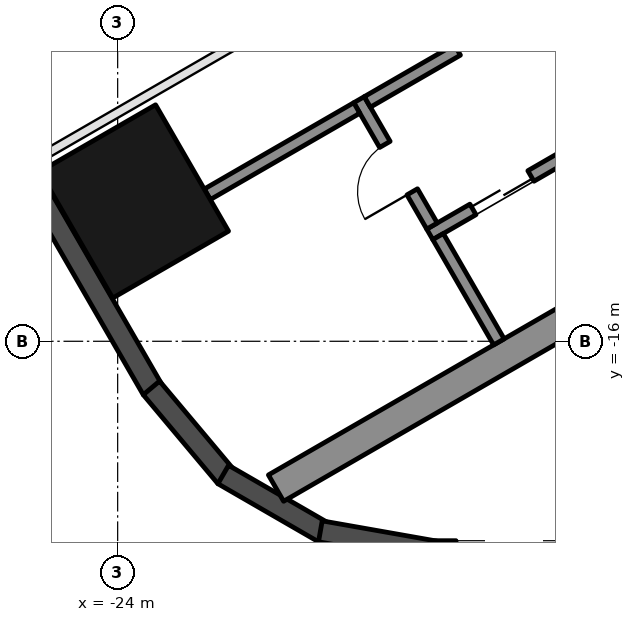
"""IFC4 building model, lengths in metres.
Left out: names, types, materials, properties, quantities, classifications, styles, units other than length and angle.
Written with IfcOpenShell. Run it as: python <this file> out.ifc"""

import sys

from ifc_helpers import new_model, si_unit, direction, frame, frame_2d, origin, origin_2d, place, context, subcontext, project, spatial, rectangle, hollow_rectangle, extrude, element, fill, save


model = new_model("IFC4")
c1 = context("Model", 3, precision=1e-05, world=origin(), true_north=direction((0.0, 1.0)))
c2 = subcontext(c1, "Body", "Model", "MODEL_VIEW")
j1 = project(units=[si_unit("LENGTHUNIT", "METRE"), si_unit("PLANEANGLEUNIT", "RADIAN")], contexts=[c1])
p1 = place(None, origin())
s1 = spatial("IfcSite", under=j1, at=p1, CompositionType="ELEMENT")
p2 = place(p1, origin())
s2 = spatial("IfcBuilding", under=s1, at=p2, CompositionType="ELEMENT")
p3 = place(p2, frame((0.0, 0.0, 216.9)))
s3 = spatial("IfcBuildingStorey", under=s2, at=p3, CompositionType="ELEMENT", Elevation=216.9)
p4 = place(p3, frame((-23.729, -13.7, 0.0), z_axis=(0.0, 0.0, 1.0), x_axis=(-0.5, 0.866025403784, 0.0)))
e1 = element("IfcColumn", 1, at=p4, inside=s3, PredefinedType="COLUMN", context=c2, shape_type="SweptSolid", body=[
    extrude(hollow_rectangle(XDim=2.4, YDim=2.2, WallThickness=0.06, at=origin_2d()), origin(), (0.0, 0.0, 1.0), 3.7),
])
p5 = place(p3, frame((-26.257, -11.893, 0.0), z_axis=(0.0, 0.0, 1.0), x_axis=(0.500018773155, -0.866014564827, 0.0)))
e2 = element("IfcWall", 2, at=p5, inside=s3, PredefinedType="SOLIDWALL", context=c2, shape_type="SweptSolid", body=[
    extrude(rectangle(XDim=5.658, YDim=0.35, at=frame_2d((2.829, 0.0))), origin(), (0.0, 0.0, 1.0), 3.55),
])
for number, where, z_axis, x_axis in (
    (3, (-23.445, -16.768, 0.0), (0.0, 0.0, 1.0), (0.643, -0.766, 0.0)),
    (4, (-22.264, -18.192, 0.0), (0.0, 0.0, 1.0), (0.866, -0.5, 0.0)),
):
    element("IfcWall", number, at=place(p3, frame(where, z_axis=z_axis, x_axis=x_axis)), inside=s3, PredefinedType="SOLIDWALL", context=c2, shape_type="SweptSolid", body=[
        extrude(rectangle(XDim=1.91, YDim=0.35, at=frame_2d((0.955, 0.0))), origin(), (0.0, 0.0, 1.0), 3.55),
    ])
p6 = place(p3, frame((-20.667, -19.126, 0.0), z_axis=(0.0, 0.0, 1.0), x_axis=(0.984798995425, -0.173697837091, 0.0)))
e5 = element("IfcWall", 5, at=p6, inside=s3, PredefinedType="SOLIDWALL", context=c2, shape_type="SweptSolid", body=[
    extrude(rectangle(XDim=1.91, YDim=0.35, at=frame_2d((0.955, 0.0))), origin(), (0.0, 0.0, 1.0), 3.55),
])
p7 = place(p3, frame((-18.816, -19.455, 0.0), z_axis=(0.0, 0.0, 1.0), x_axis=(1.0, 0.0, 0.0)))
e6 = element("IfcWall", 6, at=p7, inside=s3, PredefinedType="SOLIDWALL", context=c2, shape_type="SweptSolid", body=[
    extrude(rectangle(XDim=11.816, YDim=0.35, at=frame_2d((5.908, 0.0))), origin(), (0.0, 0.0, 1.0), 3.55),
])
p8 = place(p7, frame((0.381, 0.0, 0.3)))
e7 = element("IfcOpeningElement", 7, at=p8, cuts=e6, PredefinedType="OPENING", context=c2, shape_type="SweptSolid", body=[
    extrude(rectangle(XDim=1.9, YDim=2.65, at=frame_2d((0.95, 1.325))), frame((0.0, 0.185, 0.0), z_axis=(0.0, -1.0, 0.0), x_axis=(1.0, 0.0, 0.0)), (0.0, 0.0, 1.0), 0.37),
])
p9 = place(p7, frame((7.79, 0.0, 0.0)))
e8 = element("IfcOpeningElement", 8, at=p9, cuts=e6, PredefinedType="OPENING", context=c2, shape_type="SweptSolid", body=[
    extrude(rectangle(XDim=2.4, YDim=2.4, at=frame_2d((1.2, 1.2))), frame((0.0, 0.185, 0.0), z_axis=(0.0, -1.0, 0.0), x_axis=(1.0, 0.0, 0.0)), (0.0, 0.0, 1.0), 0.37),
])
p10 = place(p7, frame((3.741, 0.0, 0.3)))
e9 = element("IfcOpeningElement", 9, at=p10, cuts=e6, PredefinedType="OPENING", context=c2, shape_type="SweptSolid", body=[
    extrude(rectangle(XDim=1.7, YDim=2.65, at=frame_2d((0.85, 1.325))), frame((0.0, 0.185, 0.0), z_axis=(0.0, -1.0, 0.0), x_axis=(1.0, 0.0, 0.0)), (0.0, 0.0, 1.0), 0.37),
])
p11 = place(p7, frame((5.741, 0.0, 0.3)))
e10 = element("IfcOpeningElement", 10, at=p11, cuts=e6, PredefinedType="OPENING", context=c2, shape_type="SweptSolid", body=[
    extrude(rectangle(XDim=1.7, YDim=2.65, at=frame_2d((0.85, 1.325))), frame((0.0, 0.185, 0.0), z_axis=(0.0, -1.0, 0.0), x_axis=(1.0, 0.0, 0.0)), (0.0, 0.0, 1.0), 0.37),
])
p12 = place(p3, frame((-8.547, -10.997, 0.0), z_axis=(0.0, 0.0, 1.0), x_axis=(-0.866025009528, -0.500000682871, 0.0)))
e11 = element("IfcWall", 11, at=p12, inside=s3, PredefinedType="SHEAR", context=c2, shape_type="SweptSolid", body=[
    extrude(rectangle(XDim=14.837, YDim=0.5, at=frame_2d((7.418, 0.0))), origin(), (0.0, 0.0, 1.0), 3.5),
])
p13 = place(p3, frame((-10.068, -9.162, 0.0), z_axis=(0.0, 0.0, 1.0), x_axis=(-0.866032725843, -0.499987317609, 0.0)))
e12 = element("IfcWall", 12, at=p13, inside=s3, PredefinedType="SHEAR", context=c2, shape_type="SweptSolid", body=[
    extrude(rectangle(XDim=10.16, YDim=0.2, at=frame_2d((5.08, 0.0))), origin(), (0.0, 0.0, 1.0), 3.5),
])
p14 = place(p13, frame((0.62, 0.0, 0.0)))
e13 = element("IfcOpeningElement", 13, at=p14, cuts=e12, PredefinedType="OPENING", context=c2, shape_type="SweptSolid", body=[
    extrude(rectangle(XDim=1.1, YDim=2.1, at=frame_2d((0.55, 1.05))), frame((0.0, 0.11, 0.0), z_axis=(0.0, -1.0, 0.0), x_axis=(1.0, 0.0, 0.0)), (0.0, 0.0, 1.0), 0.22),
])
p15 = place(p13, frame((3.16, 0.0, 0.0)))
e14 = element("IfcOpeningElement", 14, at=p15, cuts=e12, PredefinedType="OPENING", context=c2, shape_type="SweptSolid", body=[
    extrude(rectangle(XDim=1.1, YDim=2.1, at=frame_2d((0.55, 1.05))), frame((0.0, 0.11, 0.0), z_axis=(0.0, -1.0, 0.0), x_axis=(1.0, 0.0, 0.0)), (0.0, 0.0, 1.0), 0.22),
])
p16 = place(p13, frame((5.7, 0.0, 0.0)))
e15 = element("IfcOpeningElement", 15, at=p16, cuts=e12, PredefinedType="OPENING", context=c2, shape_type="SweptSolid", body=[
    extrude(rectangle(XDim=1.1, YDim=2.1, at=frame_2d((0.55, 1.05))), frame((0.0, 0.11, 0.0), z_axis=(0.0, -1.0, 0.0), x_axis=(1.0, 0.0, 0.0)), (0.0, 0.0, 1.0), 0.22),
])
p17 = place(p13, frame((8.24, 0.0, 0.0)))
e16 = element("IfcOpeningElement", 16, at=p17, cuts=e12, PredefinedType="OPENING", context=c2, shape_type="SweptSolid", body=[
    extrude(rectangle(XDim=1.1, YDim=2.1, at=frame_2d((0.55, 1.05))), frame((0.0, 0.11, 0.0), z_axis=(0.0, -1.0, 0.0), x_axis=(1.0, 0.0, 0.0)), (0.0, 0.0, 1.0), 0.22),
])
p18 = place(p3, frame((-20.031, -12.026, 0.0), z_axis=(0.0, 0.0, 1.0), x_axis=(0.500033551112, -0.866006032174, 0.0)))
e17 = element("IfcWall", 17, at=p18, inside=s3, PredefinedType="SHEAR", context=c2, shape_type="SweptSolid", body=[
    extrude(rectangle(XDim=2.4, YDim=0.2, at=frame_2d((1.2, 0.0))), origin(), (0.0, 0.0, 1.0), 3.5),
])
p19 = place(p18, frame((0.85, 0.0, 0.0)))
e18 = element("IfcOpeningElement", 18, at=p19, cuts=e17, PredefinedType="OPENING", context=c2, shape_type="SweptSolid", body=[
    extrude(rectangle(XDim=0.9, YDim=2.1, at=frame_2d((0.45, 1.05))), frame((0.0, 0.11, 0.0), z_axis=(0.0, -1.0, 0.0), x_axis=(1.0, 0.0, 0.0)), (0.0, 0.0, 1.0), 0.22),
])
p20 = place(p3, frame((-18.413, -11.208, 0.0), z_axis=(0.0, 0.0, 1.0), x_axis=(-0.866038183914, -0.499977863513, 0.0)))
e19 = element("IfcWall", 19, at=p20, inside=s3, PredefinedType="SHEAR", context=c2, shape_type="SweptSolid", body=[
    extrude(rectangle(XDim=1.71, YDim=0.2, at=frame_2d((0.855, 0.0))), origin(), (0.0, 0.0, 1.0), 3.5),
])
p21 = place(p3, frame((-18.73, -14.278, 0.0), z_axis=(0.0, 0.0, 1.0), x_axis=(0.50002537861, -0.866010750942, 0.0)))
e20 = element("IfcWall", 20, at=p21, inside=s3, PredefinedType="SHEAR", context=c2, shape_type="SweptSolid", body=[
    extrude(rectangle(XDim=2.0, YDim=0.2, at=frame_2d((1.0, 0.0))), origin(), (0.0, 0.0, 1.0), 3.5),
])
p22 = place(p3, frame((-20.067, -12.163, 0.0), z_axis=(0.0, 0.0, 1.0), x_axis=(-0.866055327414, -0.49994816717, 0.0)))
e21 = element("IfcWall", 21, at=p22, inside=s3, PredefinedType="SHEAR", context=c2, shape_type="SweptSolid", body=[
    extrude(rectangle(XDim=2.84, YDim=0.2, at=frame_2d((1.42, 0.0))), origin(), (0.0, 0.0, 1.0), 3.5),
])
p23 = place(p3, frame((-19.363, -9.562, 0.0), z_axis=(0.0, 0.0, 1.0), x_axis=(-0.866016523273, -0.500015381182, 0.0)))
e22 = element("IfcWall", 22, at=p23, inside=s3, PredefinedType="PARTITIONING", context=c2, shape_type="SweptSolid", body=[
    extrude(rectangle(XDim=6.95, YDim=0.15, at=frame_2d((3.475, 0.0))), origin(), (0.0, 0.0, 1.0), 3.5),
])
p24 = place(p17, origin())
e23 = element("IfcDoor", 23, at=p24, inside=s3, OperationType="DOUBLE_DOOR_SLIDING", PredefinedType="DOOR", context=c2, shape_type="SweptSolid", body=[
    extrude(rectangle(XDim=1.1, YDim=2.1, at=frame_2d((0.55, 1.05))), frame((0.0, 0.025, 0.0), z_axis=(0.0, -1.0, 0.0), x_axis=(1.0, 0.0, 0.0)), (0.0, 0.0, 1.0), 0.05),
])
fill(e16, e23)
p25 = place(p19, frame((0.9, 0.0, 0.0), z_axis=(0.0, 0.0, 1.0), x_axis=(-1.0, 0.0, 0.0)))
e24 = element("IfcDoor", 24, at=p25, inside=s3, OperationType="SINGLE_SWING_LEFT", PredefinedType="DOOR", context=c2, shape_type="SweptSolid", body=[
    extrude(rectangle(XDim=0.9, YDim=2.1, at=frame_2d((0.45, 1.05))), frame((0.0, 0.025, 0.0), z_axis=(0.0, -1.0, 0.0), x_axis=(1.0, 0.0, 0.0)), (0.0, 0.0, 1.0), 0.05),
])
fill(e18, e24)
save(model, sys.argv[1])
